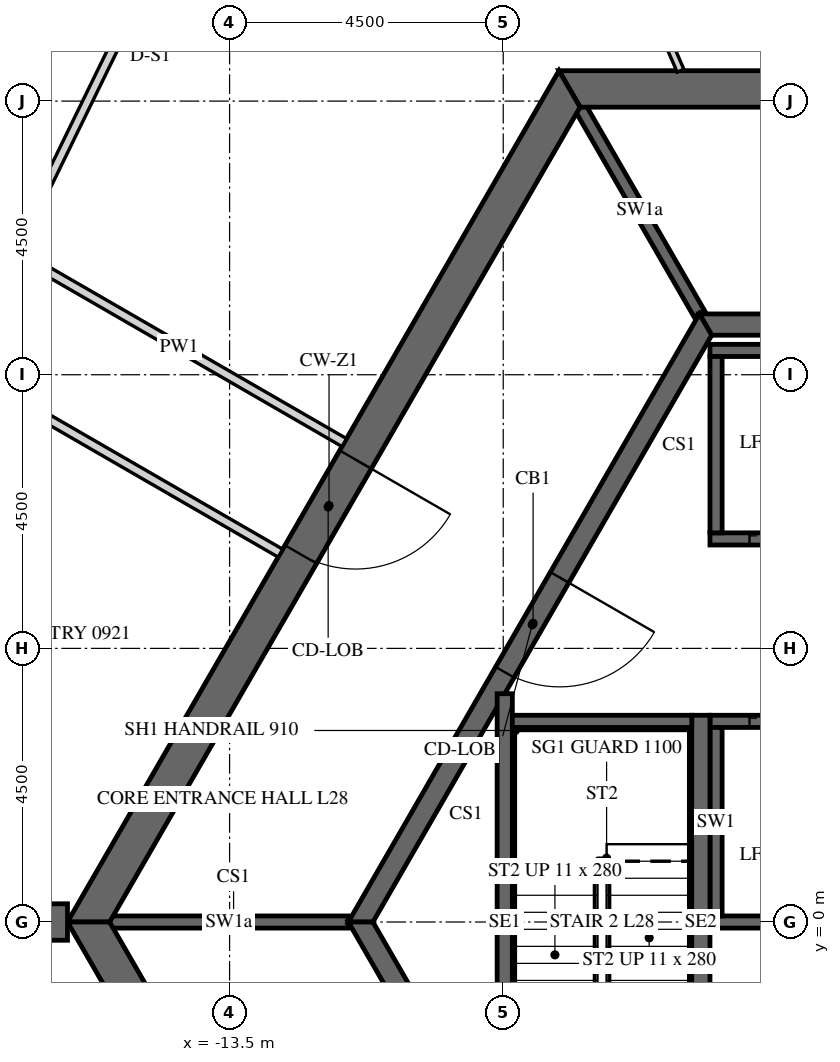
"""IFC4 building model, lengths in metres.
Left out: names, types, materials, properties, quantities, classifications, styles, units other than length and angle.
Written with IfcOpenShell. Run it as: python <this file> out.ifc"""

import sys

from ifc_helpers import new_model, si_unit, direction, frame, frame_2d, origin, place, context, subcontext, project, spatial, polyline, rectangle, outline, extrude, element, fill, save


model = new_model("IFC4")
c1 = context("Model", 3, precision=1e-05, world=origin(), true_north=direction((0.0, 1.0)))
c2 = subcontext(c1, "Body", "Model", "MODEL_VIEW")
j1 = project(units=[si_unit("LENGTHUNIT", "METRE"), si_unit("PLANEANGLEUNIT", "RADIAN")], contexts=[c1])
p1 = place(None, origin())
s1 = spatial("IfcSite", under=j1, at=p1, CompositionType="ELEMENT")
p2 = place(p1, origin())
s2 = spatial("IfcBuilding", under=s1, at=p2, CompositionType="ELEMENT")
p3 = place(p2, frame((0.0, 0.0, 123.3)))
s3 = spatial("IfcBuildingStorey", under=s2, at=p3, CompositionType="ELEMENT", Elevation=123.3)
p4 = place(p3, frame((-7.91, 13.7, -0.15), z_axis=(0.0, 0.0, 1.0), x_axis=(-0.499999880136, -0.866025472988, 0.0)))
e1 = element("IfcWall", 1, at=p4, inside=s3, PredefinedType="SHEAR", context=c2, shape_type="SweptSolid", body=[
    extrude(outline(polyline([(-0.173, -0.3), (15.993, -0.3), (15.646, 0.3), (0.173, 0.3), (-0.173, -0.3)])), origin(), (0.0, 0.0, 1.0), 3.9),
])
p5 = place(p4, frame((7.039, 0.0, 0.15)))
e2 = element("IfcOpeningElement", 2, at=p5, cuts=e1, PredefinedType="OPENING", context=c2, shape_type="SweptSolid", body=[
    extrude(rectangle(XDim=1.8, YDim=2.4, at=frame_2d((0.9, 1.2))), frame((0.0, 0.31, 0.0), z_axis=(0.0, -1.0, 0.0), x_axis=(1.0, 0.0, 0.0)), (0.0, 0.0, 1.0), 0.62),
])
p6 = place(p3, frame((-15.819, 0.0, -0.15), z_axis=(0.0, 0.0, 1.0), x_axis=(0.499999880136, -0.866025472988, 0.0)))
e3 = element("IfcWall", 3, at=p6, inside=s3, PredefinedType="SHEAR", context=c2, shape_type="SweptSolid", body=[
    extrude(outline(polyline([(-0.173, -0.3), (15.993, -0.3), (15.646, 0.3), (0.173, 0.3), (-0.173, -0.3)])), origin(), (0.0, 0.0, 1.0), 3.9),
])
p7 = place(p6, frame((6.981, 0.0, 0.15)))
e4 = element("IfcOpeningElement", 4, at=p7, cuts=e3, PredefinedType="OPENING", context=c2, shape_type="SweptSolid", body=[
    extrude(rectangle(XDim=1.8, YDim=2.4, at=frame_2d((0.9, 1.2))), frame((0.0, 0.31, 0.0), z_axis=(0.0, -1.0, 0.0), x_axis=(1.0, 0.0, 0.0)), (0.0, 0.0, 1.0), 0.62),
])
p8 = place(p3, frame((7.91, 13.7, -0.15), z_axis=(0.0, 0.0, 1.0), x_axis=(-1.0, 0.0, 0.0)))
e5 = element("IfcWall", 5, at=p8, inside=s3, PredefinedType="SHEAR", context=c2, shape_type="SweptSolid", body=[
    extrude(outline(polyline([(-0.173, -0.3), (15.993, -0.3), (15.646, 0.3), (0.173, 0.3), (-0.173, -0.3)])), origin(), (0.0, 0.0, 1.0), 3.9),
])
p9 = place(p8, frame((7.31, 0.0, 0.15)))
e6 = element("IfcOpeningElement", 6, at=p9, cuts=e5, PredefinedType="OPENING", context=c2, shape_type="SweptSolid", body=[
    extrude(rectangle(XDim=1.2, YDim=2.4, at=frame_2d((0.6, 1.2))), frame((0.0, 0.31, 0.0), z_axis=(0.0, -1.0, 0.0), x_axis=(1.0, 0.0, 0.0)), (0.0, 0.0, 1.0), 0.62),
])
p10 = place(p3, frame((-16.166, 0.0, -0.15), z_axis=(0.0, 0.0, 1.0), x_axis=(-1.0, 0.0, 0.0)))
e7 = element("IfcWall", 7, at=p10, inside=s3, PredefinedType="SHEAR", context=c2, shape_type="SweptSolid", body=[
    extrude(rectangle(XDim=16.509, YDim=0.6, at=frame_2d((8.254, 0.0))), origin(), (0.0, 0.0, 1.0), 3.9),
])
p11 = place(p10, frame((7.354, 0.0, 0.15)))
e8 = element("IfcOpeningElement", 8, at=p11, cuts=e7, PredefinedType="OPENING", context=c2, shape_type="SweptSolid", body=[
    extrude(rectangle(XDim=1.8, YDim=2.4, at=frame_2d((0.9, 1.2))), frame((0.0, 0.31, 0.0), z_axis=(0.0, -1.0, 0.0), x_axis=(1.0, 0.0, 0.0)), (0.0, 0.0, 1.0), 0.62),
])
p12 = place(p3, frame((-5.673, 9.825, -0.15), z_axis=(0.0, 0.0, 1.0), x_axis=(-0.499995046907, -0.866028263435, 0.0)))
e9 = element("IfcWall", 9, at=p12, inside=s3, PredefinedType="SHEAR", context=c2, shape_type="SweptSolid", body=[
    extrude(outline(polyline([(-0.101, -0.175), (11.446, -0.175), (11.244, 0.175), (0.101, 0.175), (-0.101, -0.175)])), origin(), (0.0, 0.0, 1.0), 3.9),
])
p13 = place(p12, frame((4.801, 0.0, 0.15)))
e10 = element("IfcOpeningElement", 10, at=p13, cuts=e9, PredefinedType="OPENING", context=c2, shape_type="SweptSolid", body=[
    extrude(rectangle(XDim=1.8, YDim=2.4, at=frame_2d((0.9, 1.2))), frame((0.0, 0.185, 0.0), z_axis=(0.0, -1.0, 0.0), x_axis=(1.0, 0.0, 0.0)), (0.0, 0.0, 1.0), 0.37),
])
p14 = place(p3, frame((-11.345, 0.0, -0.15), z_axis=(0.0, 0.0, 1.0), x_axis=(0.499995046907, -0.866028263435, 0.0)))
e11 = element("IfcWall", 11, at=p14, inside=s3, PredefinedType="SHEAR", context=c2, shape_type="SweptSolid", body=[
    extrude(outline(polyline([(-0.101, -0.175), (11.446, -0.175), (11.244, 0.175), (0.101, 0.175), (-0.101, -0.175)])), origin(), (0.0, 0.0, 1.0), 3.9),
])
p15 = place(p14, frame((4.744, 0.0, 0.15)))
e12 = element("IfcOpeningElement", 12, at=p15, cuts=e11, PredefinedType="OPENING", context=c2, shape_type="SweptSolid", body=[
    extrude(rectangle(XDim=1.8, YDim=2.4, at=frame_2d((0.9, 1.2))), frame((0.0, 0.185, 0.0), z_axis=(0.0, -1.0, 0.0), x_axis=(1.0, 0.0, 0.0)), (0.0, 0.0, 1.0), 0.37),
])
p16 = place(p3, frame((5.673, 9.825, -0.15), z_axis=(0.0, 0.0, 1.0), x_axis=(-1.0, 0.0, 0.0)))
e13 = element("IfcWall", 13, at=p16, inside=s3, PredefinedType="SHEAR", context=c2, shape_type="SweptSolid", body=[
    extrude(outline(polyline([(-0.101, -0.175), (11.446, -0.175), (11.244, 0.175), (0.101, 0.175), (-0.101, -0.175)])), origin(), (0.0, 0.0, 1.0), 3.9),
])
p17 = place(p3, frame((-5.6, 6.3, -0.25), z_axis=(0.0, 0.0, 1.0), x_axis=(1.0, 0.0, 0.0)))
e14 = element("IfcWall", 14, at=p17, inside=s3, PredefinedType="SHEAR", context=c2, shape_type="SweptSolid", body=[
    extrude(rectangle(XDim=11.2, YDim=0.2, at=frame_2d((5.6, 0.0))), origin(), (0.0, 0.0, 1.0), 3.9),
])
p18 = place(p17, frame((0.65, 0.0, 0.25)))
e15 = element("IfcOpeningElement", 15, at=p18, cuts=e14, PredefinedType="OPENING", context=c2, shape_type="SweptSolid", body=[
    extrude(rectangle(XDim=1.1, YDim=2.1, at=frame_2d((0.55, 1.05))), frame((0.0, 0.11, 0.0), z_axis=(0.0, -1.0, 0.0), x_axis=(1.0, 0.0, 0.0)), (0.0, 0.0, 1.0), 0.22),
])
p19 = place(p17, frame((2.85, 0.0, 0.25)))
e16 = element("IfcOpeningElement", 16, at=p19, cuts=e14, PredefinedType="OPENING", context=c2, shape_type="SweptSolid", body=[
    extrude(rectangle(XDim=1.1, YDim=2.1, at=frame_2d((0.55, 1.05))), frame((0.0, 0.11, 0.0), z_axis=(0.0, -1.0, 0.0), x_axis=(1.0, 0.0, 0.0)), (0.0, 0.0, 1.0), 0.22),
])
p20 = place(p17, frame((5.05, 0.0, 0.25)))
e17 = element("IfcOpeningElement", 17, at=p20, cuts=e14, PredefinedType="OPENING", context=c2, shape_type="SweptSolid", body=[
    extrude(rectangle(XDim=1.1, YDim=2.1, at=frame_2d((0.55, 1.05))), frame((0.0, 0.11, 0.0), z_axis=(0.0, -1.0, 0.0), x_axis=(1.0, 0.0, 0.0)), (0.0, 0.0, 1.0), 0.22),
])
p21 = place(p17, frame((7.25, 0.0, 0.25)))
e18 = element("IfcOpeningElement", 18, at=p21, cuts=e14, PredefinedType="OPENING", context=c2, shape_type="SweptSolid", body=[
    extrude(rectangle(XDim=1.1, YDim=2.1, at=frame_2d((0.55, 1.05))), frame((0.0, 0.11, 0.0), z_axis=(0.0, -1.0, 0.0), x_axis=(1.0, 0.0, 0.0)), (0.0, 0.0, 1.0), 0.22),
])
p22 = place(p17, frame((9.45, 0.0, 0.25)))
e19 = element("IfcOpeningElement", 19, at=p22, cuts=e14, PredefinedType="OPENING", context=c2, shape_type="SweptSolid", body=[
    extrude(rectangle(XDim=1.1, YDim=2.1, at=frame_2d((0.55, 1.05))), frame((0.0, 0.11, 0.0), z_axis=(0.0, -1.0, 0.0), x_axis=(1.0, 0.0, 0.0)), (0.0, 0.0, 1.0), 0.22),
])
p23 = place(p3, frame((-5.6, 9.4, -0.25), z_axis=(0.0, 0.0, 1.0), x_axis=(1.0, 0.0, 0.0)))
e20 = element("IfcWall", 20, at=p23, inside=s3, PredefinedType="SHEAR", context=c2, shape_type="SweptSolid", body=[
    extrude(rectangle(XDim=11.2, YDim=0.2, at=frame_2d((5.6, 0.0))), origin(), (0.0, 0.0, 1.0), 3.9),
])
p24 = place(p3, frame((-5.5, 6.4, -0.25), z_axis=(0.0, 0.0, 1.0), x_axis=(0.0, 1.0, 0.0)))
e21 = element("IfcWall", 21, at=p24, inside=s3, PredefinedType="SHEAR", context=c2, shape_type="SweptSolid", body=[
    extrude(rectangle(XDim=2.9, YDim=0.2, at=frame_2d((1.45, 0.0))), origin(), (0.0, 0.0, 1.0), 3.9),
])
p25 = place(p3, frame((-5.6, 3.3, -0.25), z_axis=(0.0, 0.0, 1.0), x_axis=(1.0, 0.0, 0.0)))
e22 = element("IfcWall", 22, at=p25, inside=s3, PredefinedType="SHEAR", context=c2, shape_type="SweptSolid", body=[
    extrude(rectangle(XDim=11.2, YDim=0.2, at=frame_2d((5.6, 0.0))), origin(), (0.0, 0.0, 1.0), 3.9),
])
p26 = place(p25, frame((0.65, 0.0, 0.25)))
e23 = element("IfcOpeningElement", 23, at=p26, cuts=e22, PredefinedType="OPENING", context=c2, shape_type="SweptSolid", body=[
    extrude(rectangle(XDim=1.1, YDim=2.1, at=frame_2d((0.55, 1.05))), frame((0.0, 0.11, 0.0), z_axis=(0.0, -1.0, 0.0), x_axis=(1.0, 0.0, 0.0)), (0.0, 0.0, 1.0), 0.22),
])
p27 = place(p25, frame((2.85, 0.0, 0.25)))
e24 = element("IfcOpeningElement", 24, at=p27, cuts=e22, PredefinedType="OPENING", context=c2, shape_type="SweptSolid", body=[
    extrude(rectangle(XDim=1.1, YDim=2.1, at=frame_2d((0.55, 1.05))), frame((0.0, 0.11, 0.0), z_axis=(0.0, -1.0, 0.0), x_axis=(1.0, 0.0, 0.0)), (0.0, 0.0, 1.0), 0.22),
])
p28 = place(p25, frame((5.05, 0.0, 0.25)))
e25 = element("IfcOpeningElement", 25, at=p28, cuts=e22, PredefinedType="OPENING", context=c2, shape_type="SweptSolid", body=[
    extrude(rectangle(XDim=1.1, YDim=2.1, at=frame_2d((0.55, 1.05))), frame((0.0, 0.11, 0.0), z_axis=(0.0, -1.0, 0.0), x_axis=(1.0, 0.0, 0.0)), (0.0, 0.0, 1.0), 0.22),
])
p29 = place(p25, frame((7.25, 0.0, 0.25)))
e26 = element("IfcOpeningElement", 26, at=p29, cuts=e22, PredefinedType="OPENING", context=c2, shape_type="SweptSolid", body=[
    extrude(rectangle(XDim=1.1, YDim=2.1, at=frame_2d((0.55, 1.05))), frame((0.0, 0.11, 0.0), z_axis=(0.0, -1.0, 0.0), x_axis=(1.0, 0.0, 0.0)), (0.0, 0.0, 1.0), 0.22),
])
p30 = place(p25, frame((9.45, 0.0, 0.25)))
e27 = element("IfcOpeningElement", 27, at=p30, cuts=e22, PredefinedType="OPENING", context=c2, shape_type="SweptSolid", body=[
    extrude(rectangle(XDim=1.1, YDim=2.1, at=frame_2d((0.55, 1.05))), frame((0.0, 0.11, 0.0), z_axis=(0.0, -1.0, 0.0), x_axis=(1.0, 0.0, 0.0)), (0.0, 0.0, 1.0), 0.22),
])
p31 = place(p3, frame((-5.6, 0.0, -0.25), z_axis=(0.0, 0.0, 1.0), x_axis=(1.0, 0.0, 0.0)))
e28 = element("IfcWall", 28, at=p31, inside=s3, PredefinedType="SHEAR", context=c2, shape_type="SweptSolid", body=[
    extrude(rectangle(XDim=11.2, YDim=0.2, at=frame_2d((5.6, 0.0))), origin(), (0.0, 0.0, 1.0), 3.9),
])
p32 = place(p3, frame((-5.5, 0.1, -0.25), z_axis=(0.0, 0.0, 1.0), x_axis=(0.0, 1.0, 0.0)))
e29 = element("IfcWall", 29, at=p32, inside=s3, PredefinedType="SHEAR", context=c2, shape_type="SweptSolid", body=[
    extrude(rectangle(XDim=3.1, YDim=0.2, at=frame_2d((1.55, 0.0))), origin(), (0.0, 0.0, 1.0), 3.9),
])
p33 = place(p3, frame((-5.773, 10.0, -0.15), z_axis=(0.0, 0.0, 1.0), x_axis=(-0.500038251005, 0.86600331843, 0.0)))
e30 = element("IfcWall", 30, at=p33, inside=s3, PredefinedType="SHEAR", context=c2, shape_type="SweptSolid", body=[
    extrude(rectangle(XDim=3.926, YDim=0.2, at=frame_2d((1.963, 0.0))), origin(), (0.0, 0.0, 1.0), 3.9),
])
p34 = place(p3, frame((-11.547, 0.0, -0.15), z_axis=(0.0, 0.0, 1.0), x_axis=(-1.0, 0.0, 0.0)))
e31 = element("IfcWall", 31, at=p34, inside=s3, PredefinedType="SHEAR", context=c2, shape_type="SweptSolid", body=[
    extrude(rectangle(XDim=3.926, YDim=0.2, at=frame_2d((1.963, 0.0))), origin(), (0.0, 0.0, 1.0), 3.9),
])
p35 = place(p3, frame((-5.75, -3.4, -0.25), z_axis=(0.0, 0.0, 1.0), x_axis=(0.0, 1.0, 0.0)))
e32 = element("IfcWall", 32, at=p35, inside=s3, PredefinedType="SHEAR", context=c2, shape_type="SweptSolid", body=[
    extrude(rectangle(XDim=6.8, YDim=0.3, at=frame_2d((3.4, 0.0))), origin(), (0.0, 0.0, 1.0), 3.9),
])
p36 = place(p3, frame((-8.975, -3.755, -0.25), z_axis=(0.0, 0.0, 1.0), x_axis=(0.0, 1.0, 0.0)))
e33 = element("IfcWall", 33, at=p36, inside=s3, PredefinedType="SHEAR", context=c2, shape_type="SweptSolid", body=[
    extrude(rectangle(XDim=7.51, YDim=0.25, at=frame_2d((3.755, 0.0))), origin(), (0.0, 0.0, 1.0), 3.9),
])
p37 = place(p3, frame((-8.85, 3.3, -0.25), z_axis=(0.0, 0.0, 1.0), x_axis=(1.0, 0.0, 0.0)))
e34 = element("IfcWall", 34, at=p37, inside=s3, PredefinedType="SHEAR", context=c2, shape_type="SweptSolid", body=[
    extrude(rectangle(XDim=2.95, YDim=0.2, at=frame_2d((1.475, 0.0))), origin(), (0.0, 0.0, 1.0), 3.9),
])
p38 = place(p3, frame((-13.752, 21.875, 0.0), z_axis=(0.0, 0.0, 1.0), x_axis=(-0.438374473378, -0.898792423806, 0.0)))
e35 = element("IfcWall", 35, at=p38, inside=s3, PredefinedType="PARTITIONING", context=c2, shape_type="SweptSolid", body=[
    extrude(rectangle(XDim=21.918, YDim=0.15, at=frame_2d((10.959, 0.0))), origin(), (0.0, 0.0, 1.0), 2.988),
])
p39 = place(p38, frame((9.771, 0.0, 0.0)))
e36 = element("IfcOpeningElement", 36, at=p39, cuts=e35, PredefinedType="OPENING", context=c2, shape_type="SweptSolid", body=[
    extrude(rectangle(XDim=1.0, YDim=2.1, at=frame_2d((0.5, 1.05))), frame((0.0, 0.085, 0.0), z_axis=(0.0, -1.0, 0.0), x_axis=(1.0, 0.0, 0.0)), (0.0, 0.0, 1.0), 0.17),
])
p40 = place(p38, frame((15.412, 0.0, 0.0)))
e37 = element("IfcOpeningElement", 37, at=p40, cuts=e35, PredefinedType="OPENING", context=c2, shape_type="SweptSolid", body=[
    extrude(rectangle(XDim=1.0, YDim=2.1, at=frame_2d((0.5, 1.05))), frame((0.0, 0.085, 0.0), z_axis=(0.0, -1.0, 0.0), x_axis=(1.0, 0.0, 0.0)), (0.0, 0.0, 1.0), 0.17),
])
p41 = place(p3, frame((-11.614, 7.884, 0.0), z_axis=(0.0, 0.0, 1.0), x_axis=(-0.866025438137, 0.4999999405, 0.0)))
e38 = element("IfcWall", 38, at=p41, inside=s3, PredefinedType="PARTITIONING", context=c2, shape_type="SweptSolid", body=[
    extrude(rectangle(XDim=6.271, YDim=0.15, at=frame_2d((3.135, 0.0))), origin(), (0.0, 0.0, 1.0), 2.988),
])
p42 = place(p3, frame((-17.011, 11.087, 0.0), z_axis=(0.0, 0.0, 1.0), x_axis=(0.43836877185, 0.898795204631, 0.0)))
e39 = element("IfcWall", 39, at=p42, inside=s3, PredefinedType="PARTITIONING", context=c2, shape_type="SweptSolid", body=[
    extrude(rectangle(XDim=10.083, YDim=0.15, at=frame_2d((5.042, 0.0))), origin(), (0.0, 0.0, 1.0), 2.988),
])
p43 = place(p42, frame((4.592, 0.0, 0.0)))
e40 = element("IfcOpeningElement", 40, at=p43, cuts=e39, PredefinedType="OPENING", context=c2, shape_type="SweptSolid", body=[
    extrude(rectangle(XDim=0.9, YDim=2.1, at=frame_2d((0.45, 1.05))), frame((0.0, 0.085, 0.0), z_axis=(0.0, -1.0, 0.0), x_axis=(1.0, 0.0, 0.0)), (0.0, 0.0, 1.0), 0.17),
])
p44 = place(p3, frame((-17.902, 9.09, 0.0), z_axis=(0.0, 0.0, 1.0), x_axis=(0.866036368755, -0.499981007633, 0.0)))
e41 = element("IfcWall", 41, at=p44, inside=s3, PredefinedType="PARTITIONING", context=c2, shape_type="SweptSolid", body=[
    extrude(rectangle(XDim=6.049, YDim=0.15, at=frame_2d((3.024, 0.0))), origin(), (0.0, 0.0, 1.0), 2.988),
])
p45 = place(p3, frame((-8.724, 20.075, 0.0), z_axis=(0.0, 0.0, 1.0), x_axis=(0.398549547162, -0.917146803111, 0.0)))
e42 = element("IfcWall", 42, at=p45, inside=s3, PredefinedType="PARTITIONING", context=c2, shape_type="SweptSolid", body=[
    extrude(rectangle(XDim=6.624, YDim=0.12, at=frame_2d((3.312, 0.0))), origin(), (0.0, 0.0, 1.0), 2.988),
])
p46 = place(p5, origin())
e43 = element("IfcDoor", 43, at=p46, inside=s3, OperationType="DOUBLE_DOOR_SINGLE_SWING", PredefinedType="DOOR", context=c2, shape_type="SweptSolid", body=[
    extrude(rectangle(XDim=1.8, YDim=2.4, at=frame_2d((0.9, 1.2))), frame((0.0, 0.025, 0.0), z_axis=(0.0, -1.0, 0.0), x_axis=(1.0, 0.0, 0.0)), (0.0, 0.0, 1.0), 0.05),
])
fill(e2, e43)
p47 = place(p13, origin())
e44 = element("IfcDoor", 44, at=p47, inside=s3, OperationType="DOUBLE_DOOR_SINGLE_SWING", PredefinedType="DOOR", context=c2, shape_type="SweptSolid", body=[
    extrude(rectangle(XDim=1.8, YDim=2.4, at=frame_2d((0.9, 1.2))), frame((0.0, 0.025, 0.0), z_axis=(0.0, -1.0, 0.0), x_axis=(1.0, 0.0, 0.0)), (0.0, 0.0, 1.0), 0.05),
])
fill(e10, e44)
p48 = place(p18, origin())
e45 = element("IfcDoor", 45, at=p48, inside=s3, OperationType="SLIDING_TO_LEFT", PredefinedType="DOOR", context=c2, shape_type="SweptSolid", body=[
    extrude(rectangle(XDim=1.1, YDim=2.1, at=frame_2d((0.55, 1.05))), frame((0.0, 0.025, 0.0), z_axis=(0.0, -1.0, 0.0), x_axis=(1.0, 0.0, 0.0)), (0.0, 0.0, 1.0), 0.05),
])
fill(e15, e45)
p49 = place(p26, origin())
e46 = element("IfcDoor", 46, at=p49, inside=s3, OperationType="SLIDING_TO_LEFT", PredefinedType="DOOR", context=c2, shape_type="SweptSolid", body=[
    extrude(rectangle(XDim=1.1, YDim=2.1, at=frame_2d((0.55, 1.05))), frame((0.0, 0.025, 0.0), z_axis=(0.0, -1.0, 0.0), x_axis=(1.0, 0.0, 0.0)), (0.0, 0.0, 1.0), 0.05),
])
fill(e23, e46)
save(model, sys.argv[1])
